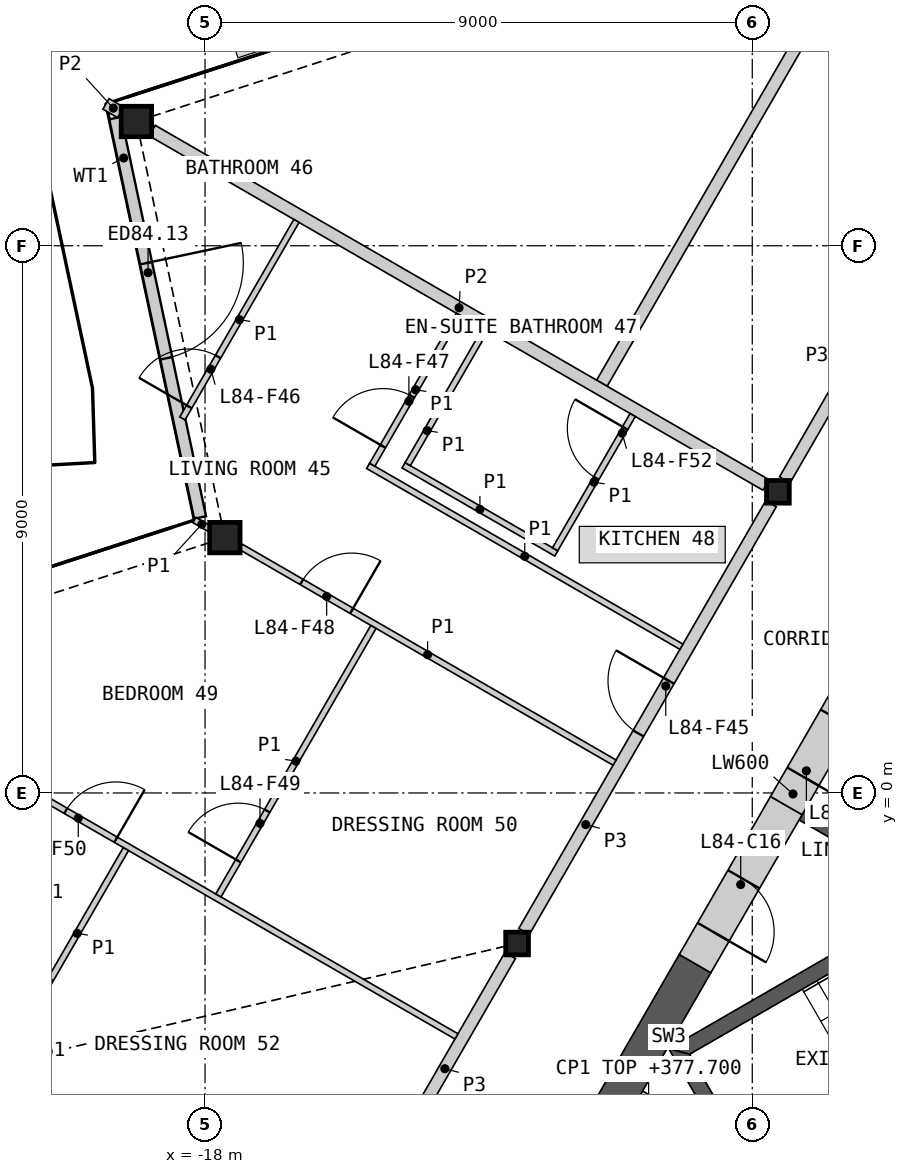
"""IFC4 building model, lengths in metres.
Left out: names, types, materials, properties, quantities, classifications, styles, units other than length and angle.
Written with IfcOpenShell. Run it as: python <this file> out.ifc"""

import sys

from ifc_helpers import new_model, si_unit, direction, frame, frame_2d, origin, origin_2d, place, context, subcontext, project, spatial, polyline, rectangle, hollow_rectangle, i_section, outline, extrude, element, fill, save


model = new_model("IFC4")
c1 = context("Model", 3, precision=1e-05, world=origin(), true_north=direction((0.0, 1.0)))
c2 = subcontext(c1, "Body", "Model", "MODEL_VIEW")
j1 = project(units=[si_unit("LENGTHUNIT", "METRE"), si_unit("PLANEANGLEUNIT", "RADIAN")], contexts=[c1])
p1 = place(None, origin())
s1 = spatial("IfcSite", under=j1, at=p1, CompositionType="ELEMENT")
p2 = place(p1, origin())
s2 = spatial("IfcBuilding", under=s1, at=p2, CompositionType="ELEMENT")
p3 = place(p2, frame((0.0, 0.0, 374.6)))
s3 = spatial("IfcBuildingStorey", under=s2, at=p3, CompositionType="ELEMENT", Elevation=374.6)
for number, where, z_axis, x_axis in (
    (1, (-19.129, 11.044, 0.0), (0.0, 0.0, 1.0), (1.0, 0.0, 0.0)),
    (2, (-17.674, 4.199, 0.0), (0.0, 0.0, 1.0), (1.0, 0.0, 0.0)),
):
    element("IfcColumn", number, at=place(p3, frame(where, z_axis=z_axis, x_axis=x_axis)), inside=s3, PredefinedType="COLUMN", context=c2, shape_type="SweptSolid", body=[
        extrude(hollow_rectangle(XDim=0.5, YDim=0.5, WallThickness=0.03, at=origin_2d()), origin(), (0.0, 0.0, 1.0), 3.4),
    ])
for number, where, z_axis, x_axis in (
    (3, (-8.578, 4.953, 0.0), (0.0, 0.0, 1.0), (1.0, 0.0, 0.0)),
    (4, (-12.868, -2.476, 0.0), (0.0, 0.0, 1.0), (1.0, 0.0, 0.0)),
):
    element("IfcColumn", number, at=place(p3, frame(where, z_axis=z_axis, x_axis=x_axis)), inside=s3, PredefinedType="COLUMN", context=c2, shape_type="SweptSolid", body=[
        extrude(i_section(OverallWidth=0.374, OverallDepth=0.372, WebThickness=0.016, FlangeThickness=0.026, at=origin_2d()), origin(), (0.0, 0.0, 1.0), 3.4),
    ])
p4 = place(p3, frame((-19.477, 11.1, 0.0), z_axis=(0.0, 0.0, 1.0), x_axis=(0.207910061304, -0.978147947096, 0.0)))
e5 = element("IfcWall", 5, at=p4, inside=s3, PredefinedType="SOLIDWALL", context=c2, shape_type="SweptSolid", body=[
    extrude(rectangle(XDim=6.716, YDim=0.2, at=frame_2d((3.358, 0.0))), origin(), (0.0, 0.0, 1.0), 2.634),
])
p5 = place(p4, frame((2.439, 0.0, 0.0)))
e6 = element("IfcOpeningElement", 6, at=p5, cuts=e5, PredefinedType="OPENING", context=c2, shape_type="SweptSolid", body=[
    extrude(rectangle(XDim=1.6, YDim=2.25, at=frame_2d((0.8, 1.125))), frame((0.0, 0.11, 0.0), z_axis=(0.0, -1.0, 0.0), x_axis=(1.0, 0.0, 0.0)), (0.0, 0.0, 1.0), 0.22),
])
p6 = place(p3, origin())
e7 = element("IfcWall", 7, at=p6, inside=s3, PredefinedType="SHEAR", context=c2, shape_type="SweptSolid", body=[
    extrude(outline(polyline([(-6.061, -1.697), (-8.231, -0.444), (-8.131, -0.271), (-5.96, -1.524), (-6.061, -1.697)])), origin(), (0.0, 0.0, 1.0), 3.1),
])
p7 = place(p3, origin())
e8 = element("IfcWall", 8, at=p7, inside=s3, PredefinedType="SHEAR", context=c2, shape_type="SweptSolid", body=[
    extrude(outline(polyline([(-5.307, -1.281), (-10.374, -4.206), (-10.032, -4.298), (-5.182, -1.498), (-5.307, -1.281)])), origin(), (0.0, 0.0, 1.0), 3.1),
])
p8 = place(p3, origin())
e9 = element("IfcWall", 9, at=p8, inside=s3, PredefinedType="SHEAR", context=c2, shape_type="SweptSolid", body=[
    extrude(outline(polyline([(-10.374, -4.206), (-8.83, -6.881), (-8.738, -6.539), (-10.032, -4.298), (-10.374, -4.206)])), origin(), (0.0, 0.0, 1.0), 3.1),
])
p9 = place(p3, origin())
e10 = element("IfcWall", 10, at=p9, inside=s3, PredefinedType="SHEAR", context=c2, shape_type="SweptSolid", body=[
    extrude(outline(polyline([(-8.738, -6.539), (-8.83, -6.881), (-3.763, -3.956), (-3.888, -3.739), (-8.738, -6.539)])), origin(), (0.0, 0.0, 1.0), 3.1),
])
p10 = place(p3, frame((-10.842, -4.967, 0.0), z_axis=(0.0, 0.0, 1.0), x_axis=(0.866098216386, -0.499873863663, 0.0)))
e11 = element("IfcWall", 11, at=p10, inside=s3, PredefinedType="PARTITIONING", context=c2, shape_type="SweptSolid", body=[
    extrude(rectangle(XDim=1.582, YDim=0.15, at=frame_2d((0.791, 0.0))), origin(), (0.0, 0.0, 1.0), 3.1),
])
p11 = place(p3, frame((-9.941, -2.807, 0.0), z_axis=(0.0, 0.0, 1.0), x_axis=(-0.500020646047, -0.866013483456, 0.0)))
e12 = element("IfcWall", 12, at=p11, inside=s3, PredefinedType="SHEAR", context=c2, shape_type="SweptSolid", body=[
    extrude(rectangle(XDim=4.559, YDim=0.6, at=frame_2d((2.28, 0.0))), origin(), (0.0, 0.0, 1.0), 3.1),
])
p12 = place(p3, frame((-8.44, -0.208, 0.0), z_axis=(0.0, 0.0, 1.0), x_axis=(-0.499997052475, -0.866027105532, 0.0)))
e13 = element("IfcWall", 13, at=p12, inside=s3, PredefinedType="SHEAR", context=c2, shape_type="SweptSolid", body=[
    extrude(rectangle(XDim=3.001, YDim=0.6, at=frame_2d((1.501, 0.0))), origin(), (0.0, 0.0, 1.0), 3.1),
])
p13 = place(p12, frame((1.4, 0.0, 0.0)))
e14 = element("IfcOpeningElement", 14, at=p13, cuts=e13, PredefinedType="OPENING", context=c2, shape_type="SweptSolid", body=[
    extrude(rectangle(XDim=1.0, YDim=2.1, at=frame_2d((0.5, 1.05))), frame((0.0, 0.31, 0.0), z_axis=(0.0, -1.0, 0.0), x_axis=(1.0, 0.0, 0.0)), (0.0, 0.0, 1.0), 0.62),
])
p14 = place(p3, frame((-7.34, 1.698, 0.0), z_axis=(0.0, 0.0, 1.0), x_axis=(-0.50002983664, -0.866008176907, 0.0)))
e15 = element("IfcWall", 15, at=p14, inside=s3, PredefinedType="SHEAR", context=c2, shape_type="SweptSolid", body=[
    extrude(rectangle(XDim=2.2, YDim=0.6, at=frame_2d((1.1, 0.0))), origin(), (0.0, 0.0, 1.0), 3.1),
])
p15 = place(p14, frame((0.55, 0.0, 0.0)))
e16 = element("IfcOpeningElement", 16, at=p15, cuts=e15, PredefinedType="OPENING", context=c2, shape_type="SweptSolid", body=[
    extrude(rectangle(XDim=1.1, YDim=2.1, at=frame_2d((0.55, 1.05))), frame((0.0, 0.31, 0.0), z_axis=(0.0, -1.0, 0.0), x_axis=(1.0, 0.0, 0.0)), (0.0, 0.0, 1.0), 0.62),
])
p16 = place(p3, frame((-8.465, 5.15, 0.0), z_axis=(0.0, 0.0, 1.0), x_axis=(0.499992155518, 0.866029932751, 0.0)))
e17 = element("IfcWall", 17, at=p16, inside=s3, PredefinedType="PARTITIONING", context=c2, shape_type="SweptSolid", body=[
    extrude(rectangle(XDim=8.123, YDim=0.2, at=frame_2d((4.062, 0.0))), origin(), (0.0, 0.0, 1.0), 3.1),
])
p17 = place(p16, frame((3.587, 0.0, 0.0)))
e18 = element("IfcOpeningElement", 18, at=p17, cuts=e17, PredefinedType="OPENING", context=c2, shape_type="SweptSolid", body=[
    extrude(rectangle(XDim=0.95, YDim=2.1, at=frame_2d((0.475, 1.05))), frame((0.0, 0.11, 0.0), z_axis=(0.0, -1.0, 0.0), x_axis=(1.0, 0.0, 0.0)), (0.0, 0.0, 1.0), 0.22),
])
p18 = place(p3, frame((-12.754, -2.279, 0.0), z_axis=(0.0, 0.0, 1.0), x_axis=(0.500001682468, 0.866024432409, 0.0)))
e19 = element("IfcWall", 19, at=p18, inside=s3, PredefinedType="PARTITIONING", context=c2, shape_type="SweptSolid", body=[
    extrude(rectangle(XDim=8.124, YDim=0.2, at=frame_2d((4.062, 0.0))), origin(), (0.0, 0.0, 1.0), 3.1),
])
p19 = place(p18, frame((3.762, 0.0, 0.0)))
e20 = element("IfcOpeningElement", 20, at=p19, cuts=e19, PredefinedType="OPENING", context=c2, shape_type="SweptSolid", body=[
    extrude(rectangle(XDim=1.0, YDim=2.1, at=frame_2d((0.5, 1.05))), frame((0.0, 0.11, 0.0), z_axis=(0.0, -1.0, 0.0), x_axis=(1.0, 0.0, 0.0)), (0.0, 0.0, 1.0), 0.22),
])
p20 = place(p3, frame((-15.131, -6.397, 0.0), z_axis=(0.0, 0.0, 1.0), x_axis=(0.499986217557, 0.866033360935, 0.0)))
e21 = element("IfcWall", 21, at=p20, inside=s3, PredefinedType="PARTITIONING", context=c2, shape_type="SweptSolid", body=[
    extrude(rectangle(XDim=4.3, YDim=0.2, at=frame_2d((2.15, 0.0))), origin(), (0.0, 0.0, 1.0), 3.1),
])
p21 = place(p3, frame((-11.473, 6.74, 0.0), z_axis=(0.0, 0.0, 1.0), x_axis=(0.500001082559, 0.866024778768, 0.0)))
e22 = element("IfcWall", 22, at=p21, inside=s3, PredefinedType="PARTITIONING", context=c2, shape_type="SweptSolid", body=[
    extrude(rectangle(XDim=15.094, YDim=0.2, at=frame_2d((7.547, 0.0))), origin(), (0.0, 0.0, 1.0), 2.33),
])
p22 = place(p21, frame((10.383, 0.0, 0.0)))
e23 = element("IfcOpeningElement", 23, at=p22, cuts=e22, PredefinedType="OPENING", context=c2, shape_type="SweptSolid", body=[
    extrude(rectangle(XDim=0.95, YDim=2.1, at=frame_2d((0.475, 1.05))), frame((0.0, 0.11, 0.0), z_axis=(0.0, -1.0, 0.0), x_axis=(1.0, 0.0, 0.0)), (0.0, 0.0, 1.0), 0.22),
])
p23 = place(p3, frame((-18.869, 10.894, 0.0), z_axis=(0.0, 0.0, 1.0), x_axis=(0.866023724155, -0.500002909193, 0.0)))
e24 = element("IfcWall", 24, at=p23, inside=s3, PredefinedType="PARTITIONING", context=c2, shape_type="SweptSolid", body=[
    extrude(rectangle(XDim=11.655, YDim=0.2, at=frame_2d((5.827, 0.0))), origin(), (0.0, 0.0, 1.0), 2.33),
])
p24 = place(p3, frame((-19.629, 11.333, 0.0), z_axis=(0.0, 0.0, 1.0), x_axis=(0.866068339032, -0.499925626596, 0.0)))
e25 = element("IfcWall", 25, at=p24, inside=s3, PredefinedType="PARTITIONING", context=c2, shape_type="SweptSolid", body=[
    extrude(rectangle(XDim=0.277, YDim=0.2, at=frame_2d((0.139, 0.0))), origin(), (0.0, 0.0, 1.0), 2.33),
])
p25 = place(p3, frame((-24.069, 1.887, 0.0), z_axis=(0.0, 0.0, 1.0), x_axis=(0.866023404247, -0.500003463284, 0.0)))
e26 = element("IfcWall", 26, at=p25, inside=s3, PredefinedType="PARTITIONING", context=c2, shape_type="SweptSolid", body=[
    extrude(rectangle(XDim=11.782, YDim=0.1, at=frame_2d((5.891, 0.0))), origin(), (0.0, 0.0, 1.0), 2.33),
])
p26 = place(p25, frame((4.363, 0.0, 0.0)))
e27 = element("IfcOpeningElement", 27, at=p26, cuts=e26, PredefinedType="OPENING", context=c2, shape_type="SweptSolid", body=[
    extrude(rectangle(XDim=0.95, YDim=2.1, at=frame_2d((0.475, 1.05))), frame((0.0, 0.06, 0.0), z_axis=(0.0, -1.0, 0.0), x_axis=(1.0, 0.0, 0.0)), (0.0, 0.0, 1.0), 0.12),
])
p27 = place(p3, frame((-17.414, 4.049, 0.0), z_axis=(0.0, 0.0, 1.0), x_axis=(0.866033839264, -0.499985389037, 0.0)))
e28 = element("IfcWall", 28, at=p27, inside=s3, PredefinedType="PARTITIONING", context=c2, shape_type="SweptSolid", body=[
    extrude(rectangle(XDim=7.1, YDim=0.1, at=frame_2d((3.55, 0.0))), origin(), (0.0, 0.0, 1.0), 2.33),
])
p28 = place(p27, frame((1.158, 0.0, 0.0)))
e29 = element("IfcOpeningElement", 29, at=p28, cuts=e28, PredefinedType="OPENING", context=c2, shape_type="SweptSolid", body=[
    extrude(rectangle(XDim=0.95, YDim=2.1, at=frame_2d((0.475, 1.05))), frame((0.0, 0.06, 0.0), z_axis=(0.0, -1.0, 0.0), x_axis=(1.0, 0.0, 0.0)), (0.0, 0.0, 1.0), 0.12),
])
p29 = place(p3, frame((-22.505, -6.472, 0.0), z_axis=(0.0, 0.0, 1.0), x_axis=(0.499999516514, 0.866025682925, 0.0)))
e30 = element("IfcWall", 30, at=p29, inside=s3, PredefinedType="PARTITIONING", context=c2, shape_type="SweptSolid", body=[
    extrude(rectangle(XDim=6.407, YDim=0.1, at=frame_2d((3.204, 0.0))), origin(), (0.0, 0.0, 1.0), 2.33),
])
p30 = place(p29, frame((2.981, 0.0, 0.0)))
e31 = element("IfcOpeningElement", 31, at=p30, cuts=e30, PredefinedType="OPENING", context=c2, shape_type="SweptSolid", body=[
    extrude(rectangle(XDim=0.95, YDim=2.1, at=frame_2d((0.475, 1.05))), frame((0.0, 0.06, 0.0), z_axis=(0.0, -1.0, 0.0), x_axis=(1.0, 0.0, 0.0)), (0.0, 0.0, 1.0), 0.12),
])
p31 = place(p3, frame((-15.318, 5.38, 0.0), z_axis=(0.0, 0.0, 1.0), x_axis=(0.866035260786, -0.499982926783, 0.0)))
e32 = element("IfcWall", 32, at=p31, inside=s3, PredefinedType="PARTITIONING", context=c2, shape_type="SweptSolid", body=[
    extrude(rectangle(XDim=5.95, YDim=0.1, at=frame_2d((2.975, 0.0))), origin(), (0.0, 0.0, 1.0), 2.33),
])
p32 = place(p3, frame((-17.78, -1.686, 0.0), z_axis=(0.0, 0.0, 1.0), x_axis=(0.500005610874, 0.86602216432, 0.0)))
e33 = element("IfcWall", 33, at=p32, inside=s3, PredefinedType="PARTITIONING", context=c2, shape_type="SweptSolid", body=[
    extrude(rectangle(XDim=5.1, YDim=0.1, at=frame_2d((2.55, 0.0))), origin(), (0.0, 0.0, 1.0), 2.33),
])
p33 = place(p32, frame((0.656, 0.0, 0.0)))
e34 = element("IfcOpeningElement", 34, at=p33, cuts=e33, PredefinedType="OPENING", context=c2, shape_type="SweptSolid", body=[
    extrude(rectangle(XDim=0.95, YDim=2.1, at=frame_2d((0.475, 1.05))), frame((0.0, 0.06, 0.0), z_axis=(0.0, -1.0, 0.0), x_axis=(1.0, 0.0, 0.0)), (0.0, 0.0, 1.0), 0.12),
])
p34 = place(p3, frame((-18.372, 6.16, 0.0), z_axis=(0.0, 0.0, 1.0), x_axis=(0.499981580887, 0.866036037803, 0.0)))
e35 = element("IfcWall", 35, at=p34, inside=s3, PredefinedType="PARTITIONING", context=c2, shape_type="SweptSolid", body=[
    extrude(rectangle(XDim=3.752, YDim=0.1, at=frame_2d((1.876, 0.0))), origin(), (0.0, 0.0, 1.0), 2.33),
])
p35 = place(p34, frame((0.222, 0.0, 0.0)))
e36 = element("IfcOpeningElement", 36, at=p35, cuts=e35, PredefinedType="OPENING", context=c2, shape_type="SweptSolid", body=[
    extrude(rectangle(XDim=0.95, YDim=2.1, at=frame_2d((0.475, 1.05))), frame((0.0, 0.06, 0.0), z_axis=(0.0, -1.0, 0.0), x_axis=(1.0, 0.0, 0.0)), (0.0, 0.0, 1.0), 0.12),
])
p36 = place(p3, frame((-15.25, 5.398, 0.0), z_axis=(0.0, 0.0, 1.0), x_axis=(0.499935029643, 0.866062911188, 0.0)))
e37 = element("IfcWall", 37, at=p36, inside=s3, PredefinedType="PARTITIONING", context=c2, shape_type="SweptSolid", body=[
    extrude(rectangle(XDim=2.85, YDim=0.1, at=frame_2d((1.425, 0.0))), origin(), (0.0, 0.0, 1.0), 2.33),
])
p37 = place(p36, frame((0.35, 0.0, 0.0)))
e38 = element("IfcOpeningElement", 38, at=p37, cuts=e37, PredefinedType="OPENING", context=c2, shape_type="SweptSolid", body=[
    extrude(rectangle(XDim=0.95, YDim=2.1, at=frame_2d((0.475, 1.05))), frame((0.0, 0.06, 0.0), z_axis=(0.0, -1.0, 0.0), x_axis=(1.0, 0.0, 0.0)), (0.0, 0.0, 1.0), 0.12),
])
p38 = place(p3, frame((-14.735, 5.389, 0.0), z_axis=(0.0, 0.0, 1.0), x_axis=(0.866032775405, -0.499987231761, 0.0)))
e39 = element("IfcWall", 39, at=p38, inside=s3, PredefinedType="PARTITIONING", context=c2, shape_type="SweptSolid", body=[
    extrude(rectangle(XDim=2.9, YDim=0.1, at=frame_2d((1.45, 0.0))), origin(), (0.0, 0.0, 1.0), 2.33),
])
p39 = place(p3, frame((-12.242, 4.008, 0.0), z_axis=(0.0, 0.0, 1.0), x_axis=(0.499948979701, 0.866054858364, 0.0)))
e40 = element("IfcWall", 40, at=p39, inside=s3, PredefinedType="PARTITIONING", context=c2, shape_type="SweptSolid", body=[
    extrude(rectangle(XDim=2.55, YDim=0.1, at=frame_2d((1.275, 0.0))), origin(), (0.0, 0.0, 1.0), 2.33),
])
p40 = place(p39, frame((1.35, 0.0, 0.0)))
e41 = element("IfcOpeningElement", 41, at=p40, cuts=e40, PredefinedType="OPENING", context=c2, shape_type="SweptSolid", body=[
    extrude(rectangle(XDim=0.95, YDim=2.1, at=frame_2d((0.475, 1.05))), frame((0.0, 0.06, 0.0), z_axis=(0.0, -1.0, 0.0), x_axis=(1.0, 0.0, 0.0)), (0.0, 0.0, 1.0), 0.12),
])
p41 = place(p3, frame((-14.667, 5.408, 0.0), z_axis=(0.0, 0.0, 1.0), x_axis=(0.499948979701, 0.866054858364, 0.0)))
e42 = element("IfcWall", 42, at=p41, inside=s3, PredefinedType="PARTITIONING", context=c2, shape_type="SweptSolid", body=[
    extrude(rectangle(XDim=2.55, YDim=0.1, at=frame_2d((1.275, 0.0))), origin(), (0.0, 0.0, 1.0), 2.33),
])
p42 = place(p3, frame((-18.174, 4.488, 0.0), z_axis=(0.0, 0.0, 1.0), x_axis=(0.866288059981, -0.499544789918, 0.0)))
e43 = element("IfcWall", 43, at=p42, inside=s3, PredefinedType="PARTITIONING", context=c2, shape_type="SweptSolid", body=[
    extrude(rectangle(XDim=0.278, YDim=0.1, at=frame_2d((0.139, 0.0))), origin(), (0.0, 0.0, 1.0), 2.33),
])
p43 = place(p5, origin())
e44 = element("IfcDoor", 44, at=p43, inside=s3, OperationType="DOUBLE_DOOR_SINGLE_SWING", PredefinedType="DOOR", context=c2, shape_type="SweptSolid", body=[
    extrude(rectangle(XDim=1.6, YDim=2.25, at=frame_2d((0.8, 1.125))), frame((0.0, 0.025, 0.0), z_axis=(0.0, -1.0, 0.0), x_axis=(1.0, 0.0, 0.0)), (0.0, 0.0, 1.0), 0.05),
])
fill(e6, e44)
p44 = place(p13, origin())
e45 = element("IfcDoor", 45, at=p44, inside=s3, OperationType="SINGLE_SWING_RIGHT", PredefinedType="DOOR", context=c2, shape_type="SweptSolid", body=[
    extrude(rectangle(XDim=1.0, YDim=2.1, at=frame_2d((0.5, 1.05))), frame((0.0, 0.055, 0.0), z_axis=(0.0, -1.0, 0.0), x_axis=(1.0, 0.0, 0.0)), (0.0, 0.0, 1.0), 0.05),
])
fill(e14, e45)
p45 = place(p15, origin())
e46 = element("IfcDoor", 46, at=p45, inside=s3, OperationType="SINGLE_SWING_RIGHT", PredefinedType="DOOR", context=c2, shape_type="SweptSolid", body=[
    extrude(rectangle(XDim=1.1, YDim=2.1, at=frame_2d((0.55, 1.05))), frame((0.0, 0.055, 0.0), z_axis=(0.0, -1.0, 0.0), x_axis=(1.0, 0.0, 0.0)), (0.0, 0.0, 1.0), 0.05),
])
fill(e16, e46)
p46 = place(p19, origin())
e47 = element("IfcDoor", 47, at=p46, inside=s3, OperationType="SINGLE_SWING_RIGHT", PredefinedType="DOOR", context=c2, shape_type="SweptSolid", body=[
    extrude(rectangle(XDim=1.0, YDim=2.1, at=frame_2d((0.5, 1.05))), frame((0.0, 0.025, 0.0), z_axis=(0.0, -1.0, 0.0), x_axis=(1.0, 0.0, 0.0)), (0.0, 0.0, 1.0), 0.05),
])
fill(e20, e47)
p47 = place(p35, origin())
e48 = element("IfcDoor", 48, at=p47, inside=s3, OperationType="SINGLE_SWING_LEFT", PredefinedType="DOOR", context=c2, shape_type="SweptSolid", body=[
    extrude(rectangle(XDim=0.95, YDim=2.1, at=frame_2d((0.475, 1.05))), frame((0.0, 0.025, 0.0), z_axis=(0.0, -1.0, 0.0), x_axis=(1.0, 0.0, 0.0)), (0.0, 0.0, 1.0), 0.05),
])
fill(e36, e48)
p48 = place(p37, origin())
e49 = element("IfcDoor", 49, at=p48, inside=s3, OperationType="SINGLE_SWING_LEFT", PredefinedType="DOOR", context=c2, shape_type="SweptSolid", body=[
    extrude(rectangle(XDim=0.95, YDim=2.1, at=frame_2d((0.475, 1.05))), frame((0.0, 0.025, 0.0), z_axis=(0.0, -1.0, 0.0), x_axis=(1.0, 0.0, 0.0)), (0.0, 0.0, 1.0), 0.05),
])
fill(e38, e49)
p49 = place(p28, origin())
e50 = element("IfcDoor", 50, at=p49, inside=s3, OperationType="SINGLE_SWING_RIGHT", PredefinedType="DOOR", context=c2, shape_type="SweptSolid", body=[
    extrude(rectangle(XDim=0.95, YDim=2.1, at=frame_2d((0.475, 1.05))), frame((0.0, 0.025, 0.0), z_axis=(0.0, -1.0, 0.0), x_axis=(1.0, 0.0, 0.0)), (0.0, 0.0, 1.0), 0.05),
])
fill(e29, e50)
p50 = place(p33, origin())
e51 = element("IfcDoor", 51, at=p50, inside=s3, OperationType="SINGLE_SWING_LEFT", PredefinedType="DOOR", context=c2, shape_type="SweptSolid", body=[
    extrude(rectangle(XDim=0.95, YDim=2.1, at=frame_2d((0.475, 1.05))), frame((0.0, 0.025, 0.0), z_axis=(0.0, -1.0, 0.0), x_axis=(1.0, 0.0, 0.0)), (0.0, 0.0, 1.0), 0.05),
])
fill(e34, e51)
p51 = place(p26, origin())
e52 = element("IfcDoor", 52, at=p51, inside=s3, OperationType="SINGLE_SWING_RIGHT", PredefinedType="DOOR", context=c2, shape_type="SweptSolid", body=[
    extrude(rectangle(XDim=0.95, YDim=2.1, at=frame_2d((0.475, 1.05))), frame((0.0, 0.025, 0.0), z_axis=(0.0, -1.0, 0.0), x_axis=(1.0, 0.0, 0.0)), (0.0, 0.0, 1.0), 0.05),
])
fill(e27, e52)
p52 = place(p30, origin())
e53 = element("IfcDoor", 53, at=p52, inside=s3, OperationType="SINGLE_SWING_RIGHT", PredefinedType="DOOR", context=c2, shape_type="SweptSolid", body=[
    extrude(rectangle(XDim=0.95, YDim=2.1, at=frame_2d((0.475, 1.05))), frame((0.0, 0.025, 0.0), z_axis=(0.0, -1.0, 0.0), x_axis=(1.0, 0.0, 0.0)), (0.0, 0.0, 1.0), 0.05),
])
fill(e31, e53)
p53 = place(p40, origin())
e54 = element("IfcDoor", 54, at=p53, inside=s3, OperationType="SINGLE_SWING_RIGHT", PredefinedType="DOOR", context=c2, shape_type="SweptSolid", body=[
    extrude(rectangle(XDim=0.95, YDim=2.1, at=frame_2d((0.475, 1.05))), frame((0.0, 0.025, 0.0), z_axis=(0.0, -1.0, 0.0), x_axis=(1.0, 0.0, 0.0)), (0.0, 0.0, 1.0), 0.05),
])
fill(e41, e54)
save(model, sys.argv[1])
